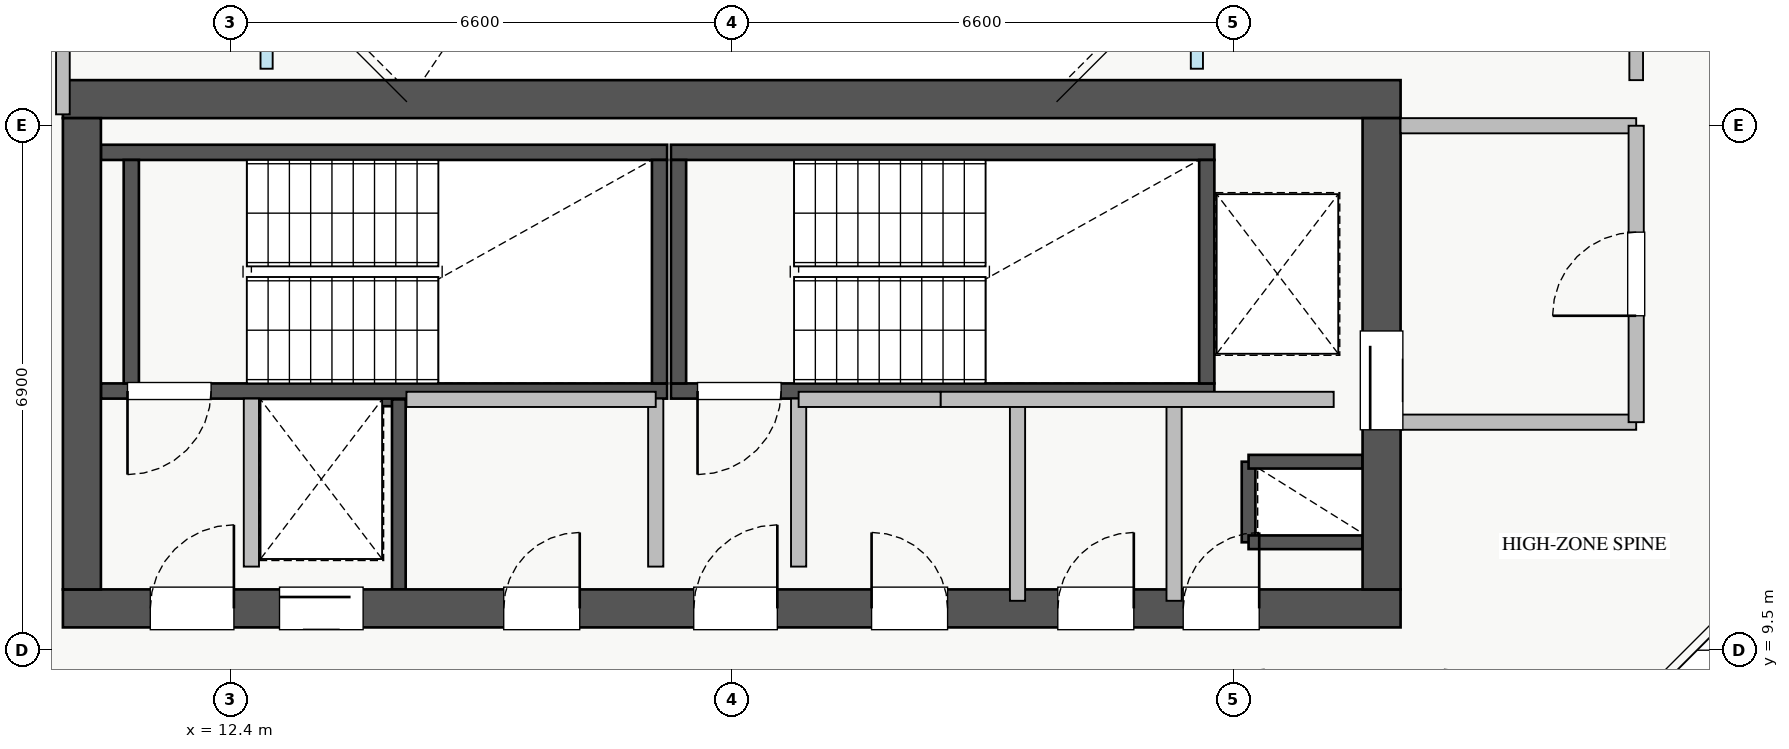
"""IFC4 building model, lengths in metres.
Left out: names, types, materials, properties, quantities, classifications, styles, units other than length and angle.
Written with IfcOpenShell. Run it as: python <this file> out.ifc"""

import sys

from ifc_helpers import new_model, si_unit, direction, frame, frame_2d, origin, place, context, subcontext, project, spatial, rectangle, extrude, source, transform, mapped, element, fill, save


model = new_model("IFC4")
c1 = context("Model", 3, precision=1e-05, world=origin(), true_north=direction((0.0, 1.0)))
c2 = subcontext(c1, "Body", "Model", "MODEL_VIEW")
j1 = project(units=[si_unit("LENGTHUNIT", "METRE"), si_unit("PLANEANGLEUNIT", "RADIAN")], contexts=[c1])
p1 = place(None, origin())
s1 = spatial("IfcSite", under=j1, at=p1, CompositionType="ELEMENT")
p2 = place(p1, origin())
s2 = spatial("IfcBuilding", under=s1, at=p2, CompositionType="ELEMENT")
p3 = place(p2, frame((0.0, 0.0, 219.75)))
s3 = spatial("IfcBuildingStorey", under=s2, at=p3, CompositionType="ELEMENT", Elevation=219.75)
p4 = place(p3, frame((12.68, 12.8, 0.0), z_axis=(0.0, 0.0, 1.0), x_axis=(1.0, 0.0, 0.0)))
e1 = element("IfcWall", 1, at=p4, inside=s3, PredefinedType="SHEAR", context=c2, shape_type="SweptSolid", body=[
    extrude(rectangle(XDim=1.94, YDim=0.18, at=frame_2d((0.97, 0.0))), origin(), (0.0, 0.0, 1.0), 3.07),
])
p5 = place(p3, frame((14.62, 10.3, 0.0), z_axis=(0.0, 0.0, 1.0), x_axis=(0.0, 1.0, 0.0)))
e2 = element("IfcWall", 2, at=p5, inside=s3, PredefinedType="SHEAR", context=c2, shape_type="SweptSolid", body=[
    extrude(rectangle(XDim=2.5, YDim=0.18, at=frame_2d((1.25, 0.0))), origin(), (0.0, 0.0, 1.0), 3.07),
])
p6 = place(p3, frame((25.8, 10.92, 0.0), z_axis=(0.0, 0.0, 1.0), x_axis=(0.0, 1.0, 0.0)))
e3 = element("IfcWall", 3, at=p6, inside=s3, PredefinedType="SHEAR", context=c2, shape_type="SweptSolid", body=[
    extrude(rectangle(XDim=1.06, YDim=0.18, at=frame_2d((0.53, 0.0))), origin(), (0.0, 0.0, 1.0), 3.07),
])
for number, where, z_axis, x_axis in (
    (4, (25.8, 11.98, 0.0), (0.0, 0.0, 1.0), (1.0, 0.0, 0.0)),
    (5, (25.8, 10.92, 0.0), (0.0, 0.0, 1.0), (1.0, 0.0, 0.0)),
):
    element("IfcWall", number, at=place(p3, frame(where, z_axis=z_axis, x_axis=x_axis)), inside=s3, PredefinedType="SHEAR", context=c2, shape_type="SweptSolid", body=[
        extrude(rectangle(XDim=1.5, YDim=0.18, at=frame_2d((0.75, 0.0))), origin(), (0.0, 0.0, 1.0), 3.07),
    ])
p7 = place(p3, frame((10.7, 12.91, 0.0), z_axis=(0.0, 0.0, 1.0), x_axis=(1.0, 0.0, 0.0)))
e6 = element("IfcWall", 6, at=p7, inside=s3, PredefinedType="SHEAR", context=c2, shape_type="SweptSolid", body=[
    extrude(rectangle(XDim=7.45, YDim=0.2, at=frame_2d((3.725, 0.0))), origin(), (0.0, 0.0, 1.0), 3.25),
])
p8 = place(p7, frame((0.35, 0.0, 0.0)))
e7 = element("IfcOpeningElement", 7, at=p8, cuts=e6, PredefinedType="OPENING", context=c2, shape_type="SweptSolid", body=[
    extrude(rectangle(XDim=1.1, YDim=2.05, at=frame_2d((0.55, 1.025))), frame((0.0, 0.11, 0.0), z_axis=(0.0, -1.0, 0.0), x_axis=(1.0, 0.0, 0.0)), (0.0, 0.0, 1.0), 0.22),
])
p9 = place(p3, frame((10.7, 16.05, 0.0), z_axis=(0.0, 0.0, 1.0), x_axis=(1.0, 0.0, 0.0)))
e8 = element("IfcWall", 8, at=p9, inside=s3, PredefinedType="SHEAR", context=c2, shape_type="SweptSolid", body=[
    extrude(rectangle(XDim=7.45, YDim=0.2, at=frame_2d((3.725, 0.0))), origin(), (0.0, 0.0, 1.0), 3.25),
])
for number, where, z_axis, x_axis in (
    (9, (11.1, 13.01, 0.0), (0.0, 0.0, 1.0), (0.0, 1.0, 0.0)),
    (10, (18.05, 13.01, 0.0), (0.0, 0.0, 1.0), (0.0, 1.0, 0.0)),
):
    element("IfcWall", number, at=place(p3, frame(where, z_axis=z_axis, x_axis=x_axis)), inside=s3, PredefinedType="SHEAR", context=c2, shape_type="SweptSolid", body=[
        extrude(rectangle(XDim=2.94, YDim=0.2, at=frame_2d((1.47, 0.0))), origin(), (0.0, 0.0, 1.0), 3.25),
    ])
p10 = place(p3, frame((18.2, 12.91, 0.0), z_axis=(0.0, 0.0, 1.0), x_axis=(1.0, 0.0, 0.0)))
e11 = element("IfcWall", 11, at=p10, inside=s3, PredefinedType="SHEAR", context=c2, shape_type="SweptSolid", body=[
    extrude(rectangle(XDim=7.15, YDim=0.2, at=frame_2d((3.575, 0.0))), origin(), (0.0, 0.0, 1.0), 3.25),
])
p11 = place(p10, frame((0.35, 0.0, 0.0)))
e12 = element("IfcOpeningElement", 12, at=p11, cuts=e11, PredefinedType="OPENING", context=c2, shape_type="SweptSolid", body=[
    extrude(rectangle(XDim=1.1, YDim=2.05, at=frame_2d((0.55, 1.025))), frame((0.0, 0.11, 0.0), z_axis=(0.0, -1.0, 0.0), x_axis=(1.0, 0.0, 0.0)), (0.0, 0.0, 1.0), 0.22),
])
p12 = place(p3, frame((18.2, 16.05, 0.0), z_axis=(0.0, 0.0, 1.0), x_axis=(1.0, 0.0, 0.0)))
e13 = element("IfcWall", 13, at=p12, inside=s3, PredefinedType="SHEAR", context=c2, shape_type="SweptSolid", body=[
    extrude(rectangle(XDim=7.15, YDim=0.2, at=frame_2d((3.575, 0.0))), origin(), (0.0, 0.0, 1.0), 3.25),
])
for number, where, z_axis, x_axis in (
    (14, (18.3, 13.01, 0.0), (0.0, 0.0, 1.0), (0.0, 1.0, 0.0)),
    (15, (25.25, 13.01, 0.0), (0.0, 0.0, 1.0), (0.0, 1.0, 0.0)),
):
    element("IfcWall", number, at=place(p3, frame(where, z_axis=z_axis, x_axis=x_axis)), inside=s3, PredefinedType="SHEAR", context=c2, shape_type="SweptSolid", body=[
        extrude(rectangle(XDim=2.94, YDim=0.2, at=frame_2d((1.47, 0.0))), origin(), (0.0, 0.0, 1.0), 3.25),
    ])
p13 = place(p3, frame((10.2, 10.05, 0.0), z_axis=(0.0, 0.0, 1.0), x_axis=(1.0, 0.0, 0.0)))
e16 = element("IfcWall", 16, at=p13, inside=s3, PredefinedType="SHEAR", context=c2, shape_type="SweptSolid", body=[
    extrude(rectangle(XDim=17.6, YDim=0.5, at=frame_2d((8.8, 0.0))), origin(), (0.0, 0.0, 1.0), 3.25),
])
p14 = place(p13, frame((1.15, 0.0, 0.0)))
e17 = element("IfcOpeningElement", 17, at=p14, cuts=e16, PredefinedType="OPENING", context=c2, shape_type="SweptSolid", body=[
    extrude(rectangle(XDim=1.1, YDim=2.05, at=frame_2d((0.55, 1.025))), frame((0.0, 0.26, 0.0), z_axis=(0.0, -1.0, 0.0), x_axis=(1.0, 0.0, 0.0)), (0.0, 0.0, 1.0), 0.52),
])
p15 = place(p13, frame((8.3, 0.0, 0.0)))
e18 = element("IfcOpeningElement", 18, at=p15, cuts=e16, PredefinedType="OPENING", context=c2, shape_type="SweptSolid", body=[
    extrude(rectangle(XDim=1.1, YDim=2.05, at=frame_2d((0.55, 1.025))), frame((0.0, 0.26, 0.0), z_axis=(0.0, -1.0, 0.0), x_axis=(1.0, 0.0, 0.0)), (0.0, 0.0, 1.0), 0.52),
])
p16 = place(p13, frame((2.85, 0.0, 0.0)))
e19 = element("IfcOpeningElement", 19, at=p16, cuts=e16, PredefinedType="OPENING", context=c2, shape_type="SweptSolid", body=[
    extrude(rectangle(XDim=1.1, YDim=2.05, at=frame_2d((0.55, 1.025))), frame((0.0, 0.26, 0.0), z_axis=(0.0, -1.0, 0.0), x_axis=(1.0, 0.0, 0.0)), (0.0, 0.0, 1.0), 0.52),
])
p17 = place(p13, frame((5.8, 0.0, 0.0)))
e20 = element("IfcOpeningElement", 20, at=p17, cuts=e16, PredefinedType="OPENING", context=c2, shape_type="SweptSolid", body=[
    extrude(rectangle(XDim=1.0, YDim=2.05, at=frame_2d((0.5, 1.025))), frame((0.0, 0.26, 0.0), z_axis=(0.0, -1.0, 0.0), x_axis=(1.0, 0.0, 0.0)), (0.0, 0.0, 1.0), 0.52),
])
p18 = place(p13, frame((14.74, 0.0, 0.0)))
e21 = element("IfcOpeningElement", 21, at=p18, cuts=e16, PredefinedType="OPENING", context=c2, shape_type="SweptSolid", body=[
    extrude(rectangle(XDim=1.0, YDim=2.05, at=frame_2d((0.5, 1.025))), frame((0.0, 0.26, 0.0), z_axis=(0.0, -1.0, 0.0), x_axis=(1.0, 0.0, 0.0)), (0.0, 0.0, 1.0), 0.52),
])
p19 = place(p13, frame((10.64, 0.0, 0.0)))
e22 = element("IfcOpeningElement", 22, at=p19, cuts=e16, PredefinedType="OPENING", context=c2, shape_type="SweptSolid", body=[
    extrude(rectangle(XDim=1.0, YDim=2.05, at=frame_2d((0.5, 1.025))), frame((0.0, 0.26, 0.0), z_axis=(0.0, -1.0, 0.0), x_axis=(1.0, 0.0, 0.0)), (0.0, 0.0, 1.0), 0.52),
])
p20 = place(p13, frame((13.09, 0.0, 0.0)))
e23 = element("IfcOpeningElement", 23, at=p20, cuts=e16, PredefinedType="OPENING", context=c2, shape_type="SweptSolid", body=[
    extrude(rectangle(XDim=1.0, YDim=2.05, at=frame_2d((0.5, 1.025))), frame((0.0, 0.26, 0.0), z_axis=(0.0, -1.0, 0.0), x_axis=(1.0, 0.0, 0.0)), (0.0, 0.0, 1.0), 0.52),
])
p21 = place(p3, frame((10.2, 16.75, 0.0), z_axis=(0.0, 0.0, 1.0), x_axis=(1.0, 0.0, 0.0)))
e24 = element("IfcWall", 24, at=p21, inside=s3, PredefinedType="SHEAR", context=c2, shape_type="SweptSolid", body=[
    extrude(rectangle(XDim=17.6, YDim=0.5, at=frame_2d((8.8, 0.0))), origin(), (0.0, 0.0, 1.0), 3.25),
])
p22 = place(p3, frame((10.45, 10.3, 0.0), z_axis=(0.0, 0.0, 1.0), x_axis=(0.0, 1.0, 0.0)))
e25 = element("IfcWall", 25, at=p22, inside=s3, PredefinedType="SHEAR", context=c2, shape_type="SweptSolid", body=[
    extrude(rectangle(XDim=6.2, YDim=0.5, at=frame_2d((3.1, 0.0))), origin(), (0.0, 0.0, 1.0), 3.25),
])
p23 = place(p3, frame((27.55, 10.3, 0.0), z_axis=(0.0, 0.0, 1.0), x_axis=(0.0, 1.0, 0.0)))
e26 = element("IfcWall", 26, at=p23, inside=s3, PredefinedType="SHEAR", context=c2, shape_type="SweptSolid", body=[
    extrude(rectangle(XDim=6.2, YDim=0.5, at=frame_2d((3.1, 0.0))), origin(), (0.0, 0.0, 1.0), 3.25),
])
p24 = place(p23, frame((2.1, 0.0, 0.0)))
e27 = element("IfcOpeningElement", 27, at=p24, cuts=e26, PredefinedType="OPENING", context=c2, shape_type="SweptSolid", body=[
    extrude(rectangle(XDim=1.3, YDim=2.05, at=frame_2d((0.65, 1.025))), frame((0.0, 0.26, 0.0), z_axis=(0.0, -1.0, 0.0), x_axis=(1.0, 0.0, 0.0)), (0.0, 0.0, 1.0), 0.52),
])
p25 = place(p3, frame((27.8, 16.4, 0.0), z_axis=(0.0, 0.0, 1.0), x_axis=(1.0, 0.0, 0.0)))
e28 = element("IfcWall", 28, at=p25, inside=s3, PredefinedType="PARTITIONING", context=c2, shape_type="SweptSolid", body=[
    extrude(rectangle(XDim=3.1, YDim=0.2, at=frame_2d((1.55, 0.0))), origin(), (0.0, 0.0, 1.0), 3.07),
])
p26 = place(p3, frame((27.8, 12.5, 0.0), z_axis=(0.0, 0.0, 1.0), x_axis=(1.0, 0.0, 0.0)))
e29 = element("IfcWall", 29, at=p26, inside=s3, PredefinedType="PARTITIONING", context=c2, shape_type="SweptSolid", body=[
    extrude(rectangle(XDim=3.1, YDim=0.2, at=frame_2d((1.55, 0.0))), origin(), (0.0, 0.0, 1.0), 2.265),
])
p27 = place(p3, frame((30.9, 12.5, 0.0), z_axis=(0.0, 0.0, 1.0), x_axis=(0.0, 1.0, 0.0)))
e30 = element("IfcWall", 30, at=p27, inside=s3, PredefinedType="PARTITIONING", context=c2, shape_type="SweptSolid", body=[
    extrude(rectangle(XDim=3.9, YDim=0.2, at=frame_2d((1.95, 0.0))), origin(), (0.0, 0.0, 1.0), 3.07),
])
p28 = place(p27, frame((1.4, 0.0, 0.0)))
e31 = element("IfcOpeningElement", 31, at=p28, cuts=e30, PredefinedType="OPENING", context=c2, shape_type="SweptSolid", body=[
    extrude(rectangle(XDim=1.1, YDim=2.05, at=frame_2d((0.55, 1.025))), frame((0.0, 0.11, 0.0), z_axis=(0.0, -1.0, 0.0), x_axis=(1.0, 0.0, 0.0)), (0.0, 0.0, 1.0), 0.22),
])
for number, where, z_axis, x_axis in (
    (32, (12.68, 10.6, 0.0), (0.0, 0.0, 1.0), (0.0, 1.0, 0.0)),
    (33, (18.0, 10.6, 0.0), (0.0, 0.0, 1.0), (0.0, 1.0, 0.0)),
    (34, (19.88, 10.6, 0.0), (0.0, 0.0, 1.0), (0.0, 1.0, 0.0)),
):
    element("IfcWall", number, at=place(p3, frame(where, z_axis=z_axis, x_axis=x_axis)), inside=s3, PredefinedType="PARTITIONING", context=c2, shape_type="SweptSolid", body=[
        extrude(rectangle(XDim=2.21, YDim=0.2, at=frame_2d((1.105, 0.0))), origin(), (0.0, 0.0, 1.0), 3.07),
    ])
p29 = place(p3, frame((14.72, 12.8, 0.0), z_axis=(0.0, 0.0, 1.0), x_axis=(1.0, 0.0, 0.0)))
e35 = element("IfcWall", 35, at=p29, inside=s3, PredefinedType="PARTITIONING", context=c2, shape_type="SweptSolid", body=[
    extrude(rectangle(XDim=3.28, YDim=0.2, at=frame_2d((1.64, 0.0))), origin(), (0.0, 0.0, 1.0), 3.07),
])
p30 = place(p3, frame((24.82, 10.15, 0.0), z_axis=(0.0, 0.0, 1.0), x_axis=(0.0, 1.0, 0.0)))
e36 = element("IfcWall", 36, at=p30, inside=s3, PredefinedType="PARTITIONING", context=c2, shape_type="SweptSolid", body=[
    extrude(rectangle(XDim=2.65, YDim=0.2, at=frame_2d((1.325, 0.0))), origin(), (0.0, 0.0, 1.0), 3.07),
])
p31 = place(p3, frame((19.88, 12.8, 0.0), z_axis=(0.0, 0.0, 1.0), x_axis=(1.0, 0.0, 0.0)))
e37 = element("IfcWall", 37, at=p31, inside=s3, PredefinedType="PARTITIONING", context=c2, shape_type="SweptSolid", body=[
    extrude(rectangle(XDim=1.87, YDim=0.2, at=frame_2d((0.935, 0.0))), origin(), (0.0, 0.0, 1.0), 3.07),
])
p32 = place(p3, frame((22.76, 10.15, 0.0), z_axis=(0.0, 0.0, 1.0), x_axis=(0.0, 1.0, 0.0)))
e38 = element("IfcWall", 38, at=p32, inside=s3, PredefinedType="PARTITIONING", context=c2, shape_type="SweptSolid", body=[
    extrude(rectangle(XDim=2.65, YDim=0.2, at=frame_2d((1.325, 0.0))), origin(), (0.0, 0.0, 1.0), 3.07),
])
p33 = place(p3, frame((21.75, 12.8, 0.0), z_axis=(0.0, 0.0, 1.0), x_axis=(1.0, 0.0, 0.0)))
e39 = element("IfcWall", 39, at=p33, inside=s3, PredefinedType="PARTITIONING", context=c2, shape_type="SweptSolid", body=[
    extrude(rectangle(XDim=5.17, YDim=0.2, at=frame_2d((2.585, 0.0))), origin(), (0.0, 0.0, 1.0), 3.07),
])
p34 = place(p3, frame((10.2, 16.55, 0.0), z_axis=(0.0, 0.0, 1.0), x_axis=(0.0, 1.0, 0.0)))
e40 = element("IfcWall", 40, at=p34, inside=s3, PredefinedType="PARTITIONING", context=c2, shape_type="SweptSolid", body=[
    extrude(rectangle(XDim=4.45, YDim=0.18, at=frame_2d((2.225, 0.0))), origin(), (0.0, 0.0, 1.0), 3.07),
])
p35 = place(p34, frame((2.025, 0.0, 0.0)))
e41 = element("IfcOpeningElement", 41, at=p35, cuts=e40, PredefinedType="OPENING", context=c2, shape_type="SweptSolid", body=[
    extrude(rectangle(XDim=0.85, YDim=2.05, at=frame_2d((0.425, 1.025))), frame((0.0, 0.1, 0.0), z_axis=(0.0, -1.0, 0.0), x_axis=(1.0, 0.0, 0.0)), (0.0, 0.0, 1.0), 0.2),
])
p36 = place(p3, frame((30.9, 17.0, 0.0), z_axis=(0.0, 0.0, 1.0), x_axis=(0.0, 1.0, 0.0)))
e42 = element("IfcWall", 42, at=p36, inside=s3, PredefinedType="PARTITIONING", context=c2, shape_type="SweptSolid", body=[
    extrude(rectangle(XDim=12.0, YDim=0.18, at=frame_2d((6.0, 0.0))), origin(), (0.0, 0.0, 1.0), 3.07),
])
p37 = place(p36, frame((1.5, 0.0, 0.0)))
e43 = element("IfcOpeningElement", 43, at=p37, cuts=e42, PredefinedType="OPENING", context=c2, shape_type="SweptSolid", body=[
    extrude(rectangle(XDim=1.0, YDim=2.05, at=frame_2d((0.5, 1.025))), frame((0.0, 0.1, 0.0), z_axis=(0.0, -1.0, 0.0), x_axis=(1.0, 0.0, 0.0)), (0.0, 0.0, 1.0), 0.2),
])
p38 = place(p36, frame((5.5, 0.0, 0.0)))
e44 = element("IfcOpeningElement", 44, at=p38, cuts=e42, PredefinedType="OPENING", context=c2, shape_type="SweptSolid", body=[
    extrude(rectangle(XDim=1.0, YDim=2.05, at=frame_2d((0.5, 1.025))), frame((0.0, 0.1, 0.0), z_axis=(0.0, -1.0, 0.0), x_axis=(1.0, 0.0, 0.0)), (0.0, 0.0, 1.0), 0.2),
])
p39 = place(p36, frame((9.5, 0.0, 0.0)))
e45 = element("IfcOpeningElement", 45, at=p39, cuts=e42, PredefinedType="OPENING", context=c2, shape_type="SweptSolid", body=[
    extrude(rectangle(XDim=1.0, YDim=2.05, at=frame_2d((0.5, 1.025))), frame((0.0, 0.1, 0.0), z_axis=(0.0, -1.0, 0.0), x_axis=(1.0, 0.0, 0.0)), (0.0, 0.0, 1.0), 0.2),
])
m1 = source(origin(), c2, "Body", "SweptSolid", [
    extrude(rectangle(XDim=1.3, YDim=2.05, at=frame_2d((0.65, 1.025))), frame((0.0, 0.025, 0.0), z_axis=(0.0, -1.0, 0.0), x_axis=(1.0, 0.0, 0.0)), (0.0, 0.0, 1.0), 0.05),
])
p40 = place(p24, origin())
e46 = element("IfcDoor", 46, at=p40, inside=s3, OperationType="SLIDING_TO_RIGHT", PredefinedType="DOOR", context=c2, shape_type="MappedRepresentation", body=[
    mapped(m1, transform((0.0, 0.0, 0.0), x_axis=(1.0, 0.0, 0.0), y_axis=(0.0, 1.0, 0.0), z_axis=(0.0, 0.0, 1.0), scale=1.0)),
])
fill(e27, e46)
m2 = source(origin(), c2, "Body", "SweptSolid", [
    extrude(rectangle(XDim=1.1, YDim=2.05, at=frame_2d((0.55, 1.025))), frame((0.0, 0.025, 0.0), z_axis=(0.0, -1.0, 0.0), x_axis=(1.0, 0.0, 0.0)), (0.0, 0.0, 1.0), 0.05),
])
p41 = place(p14, origin())
e47 = element("IfcDoor", 47, at=p41, inside=s3, OperationType="SINGLE_SWING_RIGHT", PredefinedType="DOOR", context=c2, shape_type="MappedRepresentation", body=[
    mapped(m2, transform((0.0, 0.0, 0.0), x_axis=(1.0, 0.0, 0.0), y_axis=(0.0, 1.0, 0.0), z_axis=(0.0, 0.0, 1.0), scale=1.0)),
])
fill(e17, e47)
p42 = place(p8, frame((1.1, 0.0, 0.0), z_axis=(0.0, 0.0, 1.0), x_axis=(-1.0, 0.0, 0.0)))
e48 = element("IfcDoor", 48, at=p42, inside=s3, OperationType="SINGLE_SWING_LEFT", PredefinedType="DOOR", context=c2, shape_type="MappedRepresentation", body=[
    mapped(m2, transform((0.0, 0.0, 0.0), x_axis=(1.0, 0.0, 0.0), y_axis=(0.0, 1.0, 0.0), z_axis=(0.0, 0.0, 1.0), scale=1.0)),
])
fill(e7, e48)
p43 = place(p15, origin())
e49 = element("IfcDoor", 49, at=p43, inside=s3, OperationType="SINGLE_SWING_RIGHT", PredefinedType="DOOR", context=c2, shape_type="MappedRepresentation", body=[
    mapped(m2, transform((0.0, 0.0, 0.0), x_axis=(1.0, 0.0, 0.0), y_axis=(0.0, 1.0, 0.0), z_axis=(0.0, 0.0, 1.0), scale=1.0)),
])
fill(e18, e49)
p44 = place(p11, frame((1.1, 0.0, 0.0), z_axis=(0.0, 0.0, 1.0), x_axis=(-1.0, 0.0, 0.0)))
e50 = element("IfcDoor", 50, at=p44, inside=s3, OperationType="SINGLE_SWING_LEFT", PredefinedType="DOOR", context=c2, shape_type="MappedRepresentation", body=[
    mapped(m2, transform((0.0, 0.0, 0.0), x_axis=(1.0, 0.0, 0.0), y_axis=(0.0, 1.0, 0.0), z_axis=(0.0, 0.0, 1.0), scale=1.0)),
])
fill(e12, e50)
p45 = place(p16, origin())
e51 = element("IfcDoor", 51, at=p45, inside=s3, OperationType="SLIDING_TO_RIGHT", PredefinedType="DOOR", context=c2, shape_type="MappedRepresentation", body=[
    mapped(m2, transform((0.0, 0.0, 0.0), x_axis=(1.0, 0.0, 0.0), y_axis=(0.0, 1.0, 0.0), z_axis=(0.0, 0.0, 1.0), scale=1.0)),
])
fill(e19, e51)
m3 = source(origin(), c2, "Body", "SweptSolid", [
    extrude(rectangle(XDim=1.0, YDim=2.05, at=frame_2d((0.5, 1.025))), frame((0.0, 0.025, 0.0), z_axis=(0.0, -1.0, 0.0), x_axis=(1.0, 0.0, 0.0)), (0.0, 0.0, 1.0), 0.05),
])
p46 = place(p17, origin())
e52 = element("IfcDoor", 52, at=p46, inside=s3, OperationType="SINGLE_SWING_RIGHT", PredefinedType="DOOR", context=c2, shape_type="MappedRepresentation", body=[
    mapped(m3, transform((0.0, 0.0, 0.0), x_axis=(1.0, 0.0, 0.0), y_axis=(0.0, 1.0, 0.0), z_axis=(0.0, 0.0, 1.0), scale=1.0)),
])
fill(e20, e52)
p47 = place(p18, origin())
e53 = element("IfcDoor", 53, at=p47, inside=s3, OperationType="SINGLE_SWING_RIGHT", PredefinedType="DOOR", context=c2, shape_type="MappedRepresentation", body=[
    mapped(m3, transform((0.0, 0.0, 0.0), x_axis=(1.0, 0.0, 0.0), y_axis=(0.0, 1.0, 0.0), z_axis=(0.0, 0.0, 1.0), scale=1.0)),
])
fill(e21, e53)
p48 = place(p19, origin())
e54 = element("IfcDoor", 54, at=p48, inside=s3, OperationType="SINGLE_SWING_LEFT", PredefinedType="DOOR", context=c2, shape_type="MappedRepresentation", body=[
    mapped(m3, transform((0.0, 0.0, 0.0), x_axis=(1.0, 0.0, 0.0), y_axis=(0.0, 1.0, 0.0), z_axis=(0.0, 0.0, 1.0), scale=1.0)),
])
fill(e22, e54)
p49 = place(p20, origin())
e55 = element("IfcDoor", 55, at=p49, inside=s3, OperationType="SINGLE_SWING_RIGHT", PredefinedType="DOOR", context=c2, shape_type="MappedRepresentation", body=[
    mapped(m3, transform((0.0, 0.0, 0.0), x_axis=(1.0, 0.0, 0.0), y_axis=(0.0, 1.0, 0.0), z_axis=(0.0, 0.0, 1.0), scale=1.0)),
])
fill(e23, e55)
p50 = place(p28, origin())
e56 = element("IfcDoor", 56, at=p50, inside=s3, OperationType="SINGLE_SWING_LEFT", PredefinedType="DOOR", context=c2, shape_type="MappedRepresentation", body=[
    mapped(m2, transform((0.0, 0.0, 0.0), x_axis=(1.0, 0.0, 0.0), y_axis=(0.0, 1.0, 0.0), z_axis=(0.0, 0.0, 1.0), scale=1.0)),
])
fill(e31, e56)
save(model, sys.argv[1])
